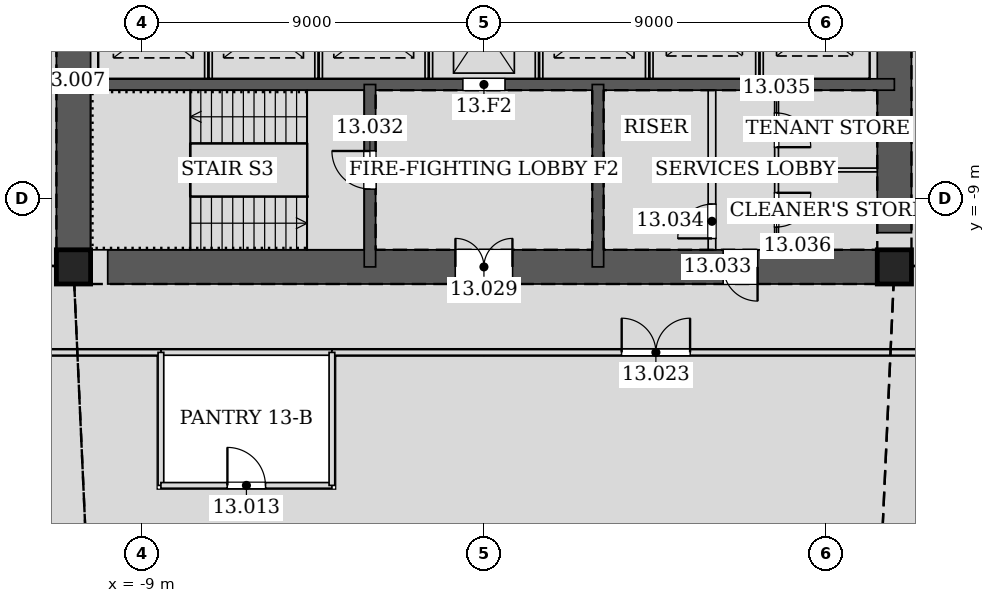
"""IFC4 building model, lengths in metres.
Left out: names, types, materials, properties, quantities, classifications, styles, units other than length and angle.
Written with IfcOpenShell. Run it as: python <this file> out.ifc"""

import sys

from ifc_helpers import new_model, si_unit, direction, frame, frame_2d, origin, origin_2d, place, context, subcontext, project, spatial, rectangle, hollow_rectangle, extrude, element, fill, save


model = new_model("IFC4")
c1 = context("Model", 3, precision=1e-05, world=origin(), true_north=direction((0.0, 1.0)))
c2 = subcontext(c1, "Body", "Model", "MODEL_VIEW")
j1 = project(units=[si_unit("LENGTHUNIT", "METRE"), si_unit("PLANEANGLEUNIT", "RADIAN")], contexts=[c1])
p1 = place(None, origin())
s1 = spatial("IfcSite", under=j1, at=p1, CompositionType="ELEMENT")
p2 = place(p1, origin())
s2 = spatial("IfcBuilding", under=s1, at=p2, CompositionType="ELEMENT")
p3 = place(p2, frame((0.0, 0.0, 62.4)))
s3 = spatial("IfcBuildingStorey", under=s2, at=p3, CompositionType="ELEMENT", Elevation=62.4)
for number, where, z_axis, x_axis in (
    (1, (-10.8, -10.8, 0.0), (0.0, 0.0, 1.0), (1.0, 0.0, 0.0)),
    (2, (10.8, -10.8, 0.0), (0.0, 0.0, 1.0), (1.0, 0.0, 0.0)),
):
    element("IfcColumn", number, at=place(p3, frame(where, z_axis=z_axis, x_axis=x_axis)), inside=s3, PredefinedType="COLUMN", context=c2, shape_type="SweptSolid", body=[
        extrude(hollow_rectangle(XDim=0.9, YDim=0.9, WallThickness=0.06, at=origin_2d()), origin(), (0.0, 0.0, 1.0), 4.2),
    ])
p4 = place(p3, frame((-10.8, -10.8, 0.0), z_axis=(0.0, 0.0, 1.0), x_axis=(1.0, 0.0, 0.0)))
e3 = element("IfcWall", 3, at=p4, inside=s3, PredefinedType="SOLIDWALL", context=c2, shape_type="SweptSolid", body=[
    extrude(rectangle(XDim=21.6, YDim=0.9, at=frame_2d((10.8, 0.0))), origin(), (0.0, 0.0, 1.0), 4.2),
])
p5 = place(p4, frame((10.05, 0.0, 0.0)))
e4 = element("IfcOpeningElement", 4, at=p5, cuts=e3, PredefinedType="OPENING", context=c2, shape_type="SweptSolid", body=[
    extrude(rectangle(XDim=1.5, YDim=2.1, at=frame_2d((0.75, 1.05))), frame((0.0, 0.46, 0.0), z_axis=(0.0, -1.0, 0.0), x_axis=(1.0, 0.0, 0.0)), (0.0, 0.0, 1.0), 0.92),
])
p6 = place(p4, frame((17.1, 0.0, 0.0)))
e5 = element("IfcOpeningElement", 5, at=p6, cuts=e3, PredefinedType="OPENING", context=c2, shape_type="SweptSolid", body=[
    extrude(rectangle(XDim=0.9, YDim=2.1, at=frame_2d((0.45, 1.05))), frame((0.0, 0.46, 0.0), z_axis=(0.0, -1.0, 0.0), x_axis=(1.0, 0.0, 0.0)), (0.0, 0.0, 1.0), 0.92),
])
p7 = place(p3, frame((10.8, -10.8, 0.0), z_axis=(0.0, 0.0, 1.0), x_axis=(0.0, 1.0, 0.0)))
e6 = element("IfcWall", 6, at=p7, inside=s3, PredefinedType="SOLIDWALL", context=c2, shape_type="SweptSolid", body=[
    extrude(rectangle(XDim=21.6, YDim=0.9, at=frame_2d((10.8, 0.0))), origin(), (0.0, 0.0, 1.0), 4.2),
])
p8 = place(p7, frame((11.7, 0.0, 0.0)))
e7 = element("IfcOpeningElement", 7, at=p8, cuts=e6, PredefinedType="OPENING", context=c2, shape_type="SweptSolid", body=[
    extrude(rectangle(XDim=1.2, YDim=2.1, at=frame_2d((0.6, 1.05))), frame((0.0, 0.46, 0.0), z_axis=(0.0, -1.0, 0.0), x_axis=(1.0, 0.0, 0.0)), (0.0, 0.0, 1.0), 0.92),
])
p9 = place(p7, frame((8.7, 0.0, 0.0)))
e8 = element("IfcOpeningElement", 8, at=p9, cuts=e6, PredefinedType="OPENING", context=c2, shape_type="SweptSolid", body=[
    extrude(rectangle(XDim=1.2, YDim=2.1, at=frame_2d((0.6, 1.05))), frame((0.0, 0.46, 0.0), z_axis=(0.0, -1.0, 0.0), x_axis=(1.0, 0.0, 0.0)), (0.0, 0.0, 1.0), 0.92),
])
p10 = place(p3, frame((-10.8, 10.8, 0.0), z_axis=(0.0, 0.0, 1.0), x_axis=(0.0, -1.0, 0.0)))
e9 = element("IfcWall", 9, at=p10, inside=s3, PredefinedType="SOLIDWALL", context=c2, shape_type="SweptSolid", body=[
    extrude(rectangle(XDim=21.6, YDim=0.9, at=frame_2d((10.8, 0.0))), origin(), (0.0, 0.0, 1.0), 4.2),
])
p11 = place(p10, frame((8.7, 0.0, 0.0)))
e10 = element("IfcOpeningElement", 10, at=p11, cuts=e9, PredefinedType="OPENING", context=c2, shape_type="SweptSolid", body=[
    extrude(rectangle(XDim=1.2, YDim=2.1, at=frame_2d((0.6, 1.05))), frame((0.0, 0.46, 0.0), z_axis=(0.0, -1.0, 0.0), x_axis=(1.0, 0.0, 0.0)), (0.0, 0.0, 1.0), 0.92),
])
p12 = place(p10, frame((11.7, 0.0, 0.0)))
e11 = element("IfcOpeningElement", 11, at=p12, cuts=e9, PredefinedType="OPENING", context=c2, shape_type="SweptSolid", body=[
    extrude(rectangle(XDim=1.2, YDim=2.1, at=frame_2d((0.6, 1.05))), frame((0.0, 0.46, 0.0), z_axis=(0.0, -1.0, 0.0), x_axis=(1.0, 0.0, 0.0)), (0.0, 0.0, 1.0), 0.92),
])
p13 = place(p3, frame((-10.8, -6.0, 0.0), z_axis=(0.0, 0.0, 1.0), x_axis=(1.0, 0.0, 0.0)))
e12 = element("IfcWall", 12, at=p13, inside=s3, PredefinedType="SOLIDWALL", context=c2, shape_type="SweptSolid", body=[
    extrude(rectangle(XDim=21.6, YDim=0.3, at=frame_2d((10.8, 0.0))), origin(), (0.0, 0.0, 1.0), 4.2),
])
p14 = place(p13, frame((10.25, 0.0, 0.0)))
e13 = element("IfcOpeningElement", 13, at=p14, cuts=e12, PredefinedType="OPENING", context=c2, shape_type="SweptSolid", body=[
    extrude(rectangle(XDim=1.1, YDim=2.1, at=frame_2d((0.55, 1.05))), frame((0.0, 0.16, 0.0), z_axis=(0.0, -1.0, 0.0), x_axis=(1.0, 0.0, 0.0)), (0.0, 0.0, 1.0), 0.32),
])
p15 = place(p3, frame((-3.0, -6.0, 0.0), z_axis=(0.0, 0.0, 1.0), x_axis=(0.0, -1.0, 0.0)))
e14 = element("IfcWall", 14, at=p15, inside=s3, PredefinedType="SOLIDWALL", context=c2, shape_type="SweptSolid", body=[
    extrude(rectangle(XDim=4.8, YDim=0.3, at=frame_2d((2.4, 0.0))), origin(), (0.0, 0.0, 1.0), 4.2),
])
p16 = place(p15, frame((1.75, 0.0, 0.0)))
e15 = element("IfcOpeningElement", 15, at=p16, cuts=e14, PredefinedType="OPENING", context=c2, shape_type="SweptSolid", body=[
    extrude(rectangle(XDim=1.0, YDim=2.1, at=frame_2d((0.5, 1.05))), frame((0.0, 0.16, 0.0), z_axis=(0.0, -1.0, 0.0), x_axis=(1.0, 0.0, 0.0)), (0.0, 0.0, 1.0), 0.32),
])
p17 = place(p3, frame((3.0, -6.0, 0.0), z_axis=(0.0, 0.0, 1.0), x_axis=(0.0, -1.0, 0.0)))
e16 = element("IfcWall", 16, at=p17, inside=s3, PredefinedType="SOLIDWALL", context=c2, shape_type="SweptSolid", body=[
    extrude(rectangle(XDim=4.8, YDim=0.3, at=frame_2d((2.4, 0.0))), origin(), (0.0, 0.0, 1.0), 4.2),
])
p18 = place(p3, frame((-8.501, -13.05, 0.0), z_axis=(0.0, 0.0, 1.0), x_axis=(1.0, 0.0, 0.0)))
e17 = element("IfcWall", 17, at=p18, inside=s3, PredefinedType="PARTITIONING", context=c2, shape_type="SweptSolid", body=[
    extrude(rectangle(XDim=4.502, YDim=0.15, at=frame_2d((2.251, 0.0))), origin(), (0.0, 0.0, 1.0), 4.035),
])
p19 = place(p3, frame((-13.05, -13.05, 0.0), z_axis=(0.0, 0.0, 1.0), x_axis=(1.0, 0.0, 0.0)))
e18 = element("IfcWall", 18, at=p19, inside=s3, PredefinedType="PARTITIONING", context=c2, shape_type="SweptSolid", body=[
    extrude(rectangle(XDim=4.551, YDim=0.15, at=frame_2d((2.275, 0.0))), origin(), (0.0, 0.0, 1.0), 3.014),
])
p20 = place(p3, frame((-4.001, -13.05, 0.0), z_axis=(0.0, 0.0, 1.0), x_axis=(1.0, 0.0, 0.0)))
e19 = element("IfcWall", 19, at=p20, inside=s3, PredefinedType="PARTITIONING", context=c2, shape_type="SweptSolid", body=[
    extrude(rectangle(XDim=17.051, YDim=0.15, at=frame_2d((8.525, 0.0))), origin(), (0.0, 0.0, 1.0), 2.984),
])
p21 = place(p20, frame((7.625, 0.0, 0.0)))
e20 = element("IfcOpeningElement", 20, at=p21, cuts=e19, PredefinedType="OPENING", context=c2, shape_type="SweptSolid", body=[
    extrude(rectangle(XDim=1.8, YDim=2.4, at=frame_2d((0.9, 1.2))), frame((0.0, 0.085, 0.0), z_axis=(0.0, -1.0, 0.0), x_axis=(1.0, 0.0, 0.0)), (0.0, 0.0, 1.0), 0.17),
])
p22 = place(p3, frame((-8.5, -13.05, 0.0), z_axis=(0.0, 0.0, 1.0), x_axis=(0.0, -1.0, 0.0)))
e21 = element("IfcWall", 21, at=p22, inside=s3, PredefinedType="PARTITIONING", context=c2, shape_type="SweptSolid", body=[
    extrude(rectangle(XDim=3.5, YDim=0.15, at=frame_2d((1.75, 0.0))), origin(), (0.0, 0.0, 1.0), 3.423),
])
p23 = place(p3, frame((-8.5, -16.55, 0.0), z_axis=(0.0, 0.0, 1.0), x_axis=(1.0, 0.0, 0.0)))
e22 = element("IfcWall", 22, at=p23, inside=s3, PredefinedType="PARTITIONING", context=c2, shape_type="SweptSolid", body=[
    extrude(rectangle(XDim=4.5, YDim=0.15, at=frame_2d((2.25, 0.0))), origin(), (0.0, 0.0, 1.0), 3.497),
])
p24 = place(p23, frame((1.75, 0.0, 0.0)))
e23 = element("IfcOpeningElement", 23, at=p24, cuts=e22, PredefinedType="OPENING", context=c2, shape_type="SweptSolid", body=[
    extrude(rectangle(XDim=1.0, YDim=2.1, at=frame_2d((0.5, 1.05))), frame((0.0, 0.085, 0.0), z_axis=(0.0, -1.0, 0.0), x_axis=(1.0, 0.0, 0.0)), (0.0, 0.0, 1.0), 0.17),
])
p25 = place(p3, frame((-4.0, -16.55, 0.0), z_axis=(0.0, 0.0, 1.0), x_axis=(0.0, 1.0, 0.0)))
e24 = element("IfcWall", 24, at=p25, inside=s3, PredefinedType="PARTITIONING", context=c2, shape_type="SweptSolid", body=[
    extrude(rectangle(XDim=3.5, YDim=0.15, at=frame_2d((1.75, 0.0))), origin(), (0.0, 0.0, 1.0), 3.423),
])
for number, where, z_axis, x_axis in (
    (25, (-7.25, -5.85, 0.0), (0.0, 0.0, 1.0), (0.0, 1.0, 0.0)),
    (26, (-4.35, -5.85, 0.0), (0.0, 0.0, 1.0), (0.0, 1.0, 0.0)),
    (27, (-1.45, -5.85, 0.0), (0.0, 0.0, 1.0), (0.0, 1.0, 0.0)),
    (28, (1.45, -5.85, 0.0), (0.0, 0.0, 1.0), (0.0, 1.0, 0.0)),
    (29, (4.35, -5.85, 0.0), (0.0, 0.0, 1.0), (0.0, 1.0, 0.0)),
    (30, (7.25, -5.85, 0.0), (0.0, 0.0, 1.0), (0.0, 1.0, 0.0)),
):
    element("IfcWall", number, at=place(p3, frame(where, z_axis=z_axis, x_axis=x_axis)), inside=s3, PredefinedType="PARTITIONING", context=c2, shape_type="SweptSolid", body=[
        extrude(rectangle(XDim=2.7, YDim=0.2, at=frame_2d((1.35, 0.0))), origin(), (0.0, 0.0, 1.0), 4.2),
    ])
p26 = place(p3, frame((6.0, -10.35, 0.0), z_axis=(0.0, 0.0, 1.0), x_axis=(0.0, 1.0, 0.0)))
e31 = element("IfcWall", 31, at=p26, inside=s3, PredefinedType="PARTITIONING", context=c2, shape_type="SweptSolid", body=[
    extrude(rectangle(XDim=4.2, YDim=0.2, at=frame_2d((2.1, 0.0))), origin(), (0.0, 0.0, 1.0), 4.035),
])
p27 = place(p26, frame((0.3, 0.0, 0.0)))
e32 = element("IfcOpeningElement", 32, at=p27, cuts=e31, PredefinedType="OPENING", context=c2, shape_type="SweptSolid", body=[
    extrude(rectangle(XDim=0.9, YDim=2.1, at=frame_2d((0.45, 1.05))), frame((0.0, 0.11, 0.0), z_axis=(0.0, -1.0, 0.0), x_axis=(1.0, 0.0, 0.0)), (0.0, 0.0, 1.0), 0.22),
])
p28 = place(p3, frame((7.7, -10.35, 0.0), z_axis=(0.0, 0.0, 1.0), x_axis=(0.0, 1.0, 0.0)))
e33 = element("IfcWall", 33, at=p28, inside=s3, PredefinedType="PARTITIONING", context=c2, shape_type="SweptSolid", body=[
    extrude(rectangle(XDim=4.2, YDim=0.1, at=frame_2d((2.1, 0.0))), origin(), (0.0, 0.0, 1.0), 4.035),
])
p29 = place(p28, frame((2.7, 0.0, 0.0)))
e34 = element("IfcOpeningElement", 34, at=p29, cuts=e33, PredefinedType="OPENING", context=c2, shape_type="SweptSolid", body=[
    extrude(rectangle(XDim=0.9, YDim=2.1, at=frame_2d((0.45, 1.05))), frame((0.0, 0.06, 0.0), z_axis=(0.0, -1.0, 0.0), x_axis=(1.0, 0.0, 0.0)), (0.0, 0.0, 1.0), 0.12),
])
p30 = place(p28, frame((0.6, 0.0, 0.0)))
e35 = element("IfcOpeningElement", 35, at=p30, cuts=e33, PredefinedType="OPENING", context=c2, shape_type="SweptSolid", body=[
    extrude(rectangle(XDim=0.9, YDim=2.1, at=frame_2d((0.45, 1.05))), frame((0.0, 0.06, 0.0), z_axis=(0.0, -1.0, 0.0), x_axis=(1.0, 0.0, 0.0)), (0.0, 0.0, 1.0), 0.12),
])
p31 = place(p3, frame((7.7, -8.25, 0.0), z_axis=(0.0, 0.0, 1.0), x_axis=(1.0, 0.0, 0.0)))
e36 = element("IfcWall", 36, at=p31, inside=s3, PredefinedType="PARTITIONING", context=c2, shape_type="SweptSolid", body=[
    extrude(rectangle(XDim=2.65, YDim=0.1, at=frame_2d((1.325, 0.0))), origin(), (0.0, 0.0, 1.0), 4.035),
])
p32 = place(p24, origin())
e37 = element("IfcDoor", 37, at=p32, inside=s3, OperationType="SINGLE_SWING_LEFT", PredefinedType="DOOR", context=c2, shape_type="SweptSolid", body=[
    extrude(rectangle(XDim=1.0, YDim=2.1, at=frame_2d((0.5, 1.05))), frame((0.0, 0.025, 0.0), z_axis=(0.0, -1.0, 0.0), x_axis=(1.0, 0.0, 0.0)), (0.0, 0.0, 1.0), 0.05),
])
fill(e23, e37)
p33 = place(p21, origin())
e38 = element("IfcDoor", 38, at=p33, inside=s3, OperationType="DOUBLE_DOOR_SINGLE_SWING", PredefinedType="DOOR", context=c2, shape_type="SweptSolid", body=[
    extrude(rectangle(XDim=1.8, YDim=2.4, at=frame_2d((0.9, 1.2))), frame((0.0, 0.025, 0.0), z_axis=(0.0, -1.0, 0.0), x_axis=(1.0, 0.0, 0.0)), (0.0, 0.0, 1.0), 0.05),
])
fill(e20, e38)
p34 = place(p5, origin())
e39 = element("IfcDoor", 39, at=p34, inside=s3, OperationType="DOUBLE_DOOR_SINGLE_SWING", PredefinedType="DOOR", context=c2, shape_type="SweptSolid", body=[
    extrude(rectangle(XDim=1.5, YDim=2.1, at=frame_2d((0.75, 1.05))), frame((0.0, 0.025, 0.0), z_axis=(0.0, -1.0, 0.0), x_axis=(1.0, 0.0, 0.0)), (0.0, 0.0, 1.0), 0.05),
])
fill(e4, e39)
p35 = place(p16, frame((1.0, 0.0, 0.0), z_axis=(0.0, 0.0, 1.0), x_axis=(-1.0, 0.0, 0.0)))
e40 = element("IfcDoor", 40, at=p35, inside=s3, OperationType="SINGLE_SWING_RIGHT", PredefinedType="DOOR", context=c2, shape_type="SweptSolid", body=[
    extrude(rectangle(XDim=1.0, YDim=2.1, at=frame_2d((0.5, 1.05))), frame((0.0, 0.025, 0.0), z_axis=(0.0, -1.0, 0.0), x_axis=(1.0, 0.0, 0.0)), (0.0, 0.0, 1.0), 0.05),
])
fill(e15, e40)
p36 = place(p6, frame((0.9, 0.0, 0.0), z_axis=(0.0, 0.0, 1.0), x_axis=(-1.0, 0.0, 0.0)))
e41 = element("IfcDoor", 41, at=p36, inside=s3, OperationType="SINGLE_SWING_LEFT", PredefinedType="DOOR", context=c2, shape_type="SweptSolid", body=[
    extrude(rectangle(XDim=0.9, YDim=2.1, at=frame_2d((0.45, 1.05))), frame((0.0, 0.025, 0.0), z_axis=(0.0, -1.0, 0.0), x_axis=(1.0, 0.0, 0.0)), (0.0, 0.0, 1.0), 0.05),
])
fill(e5, e41)
p37 = place(p27, origin())
e42 = element("IfcDoor", 42, at=p37, inside=s3, OperationType="SINGLE_SWING_LEFT", PredefinedType="DOOR", context=c2, shape_type="SweptSolid", body=[
    extrude(rectangle(XDim=0.9, YDim=2.1, at=frame_2d((0.45, 1.05))), frame((0.0, 0.025, 0.0), z_axis=(0.0, -1.0, 0.0), x_axis=(1.0, 0.0, 0.0)), (0.0, 0.0, 1.0), 0.05),
])
fill(e32, e42)
p38 = place(p29, frame((0.9, 0.0, 0.0), z_axis=(0.0, 0.0, 1.0), x_axis=(-1.0, 0.0, 0.0)))
e43 = element("IfcDoor", 43, at=p38, inside=s3, OperationType="SINGLE_SWING_RIGHT", PredefinedType="DOOR", context=c2, shape_type="SweptSolid", body=[
    extrude(rectangle(XDim=0.9, YDim=2.1, at=frame_2d((0.45, 1.05))), frame((0.0, 0.025, 0.0), z_axis=(0.0, -1.0, 0.0), x_axis=(1.0, 0.0, 0.0)), (0.0, 0.0, 1.0), 0.05),
])
fill(e34, e43)
p39 = place(p30, frame((0.9, 0.0, 0.0), z_axis=(0.0, 0.0, 1.0), x_axis=(-1.0, 0.0, 0.0)))
e44 = element("IfcDoor", 44, at=p39, inside=s3, OperationType="SINGLE_SWING_LEFT", PredefinedType="DOOR", context=c2, shape_type="SweptSolid", body=[
    extrude(rectangle(XDim=0.9, YDim=2.1, at=frame_2d((0.45, 1.05))), frame((0.0, 0.025, 0.0), z_axis=(0.0, -1.0, 0.0), x_axis=(1.0, 0.0, 0.0)), (0.0, 0.0, 1.0), 0.05),
])
fill(e35, e44)
p40 = place(p14, origin())
e45 = element("IfcDoor", 45, at=p40, inside=s3, OperationType="DOUBLE_DOOR_SLIDING", PredefinedType="DOOR", context=c2, shape_type="SweptSolid", body=[
    extrude(rectangle(XDim=1.1, YDim=2.1, at=frame_2d((0.55, 1.05))), frame((0.0, 0.025, 0.0), z_axis=(0.0, -1.0, 0.0), x_axis=(1.0, 0.0, 0.0)), (0.0, 0.0, 1.0), 0.05),
])
fill(e13, e45)
save(model, sys.argv[1])
